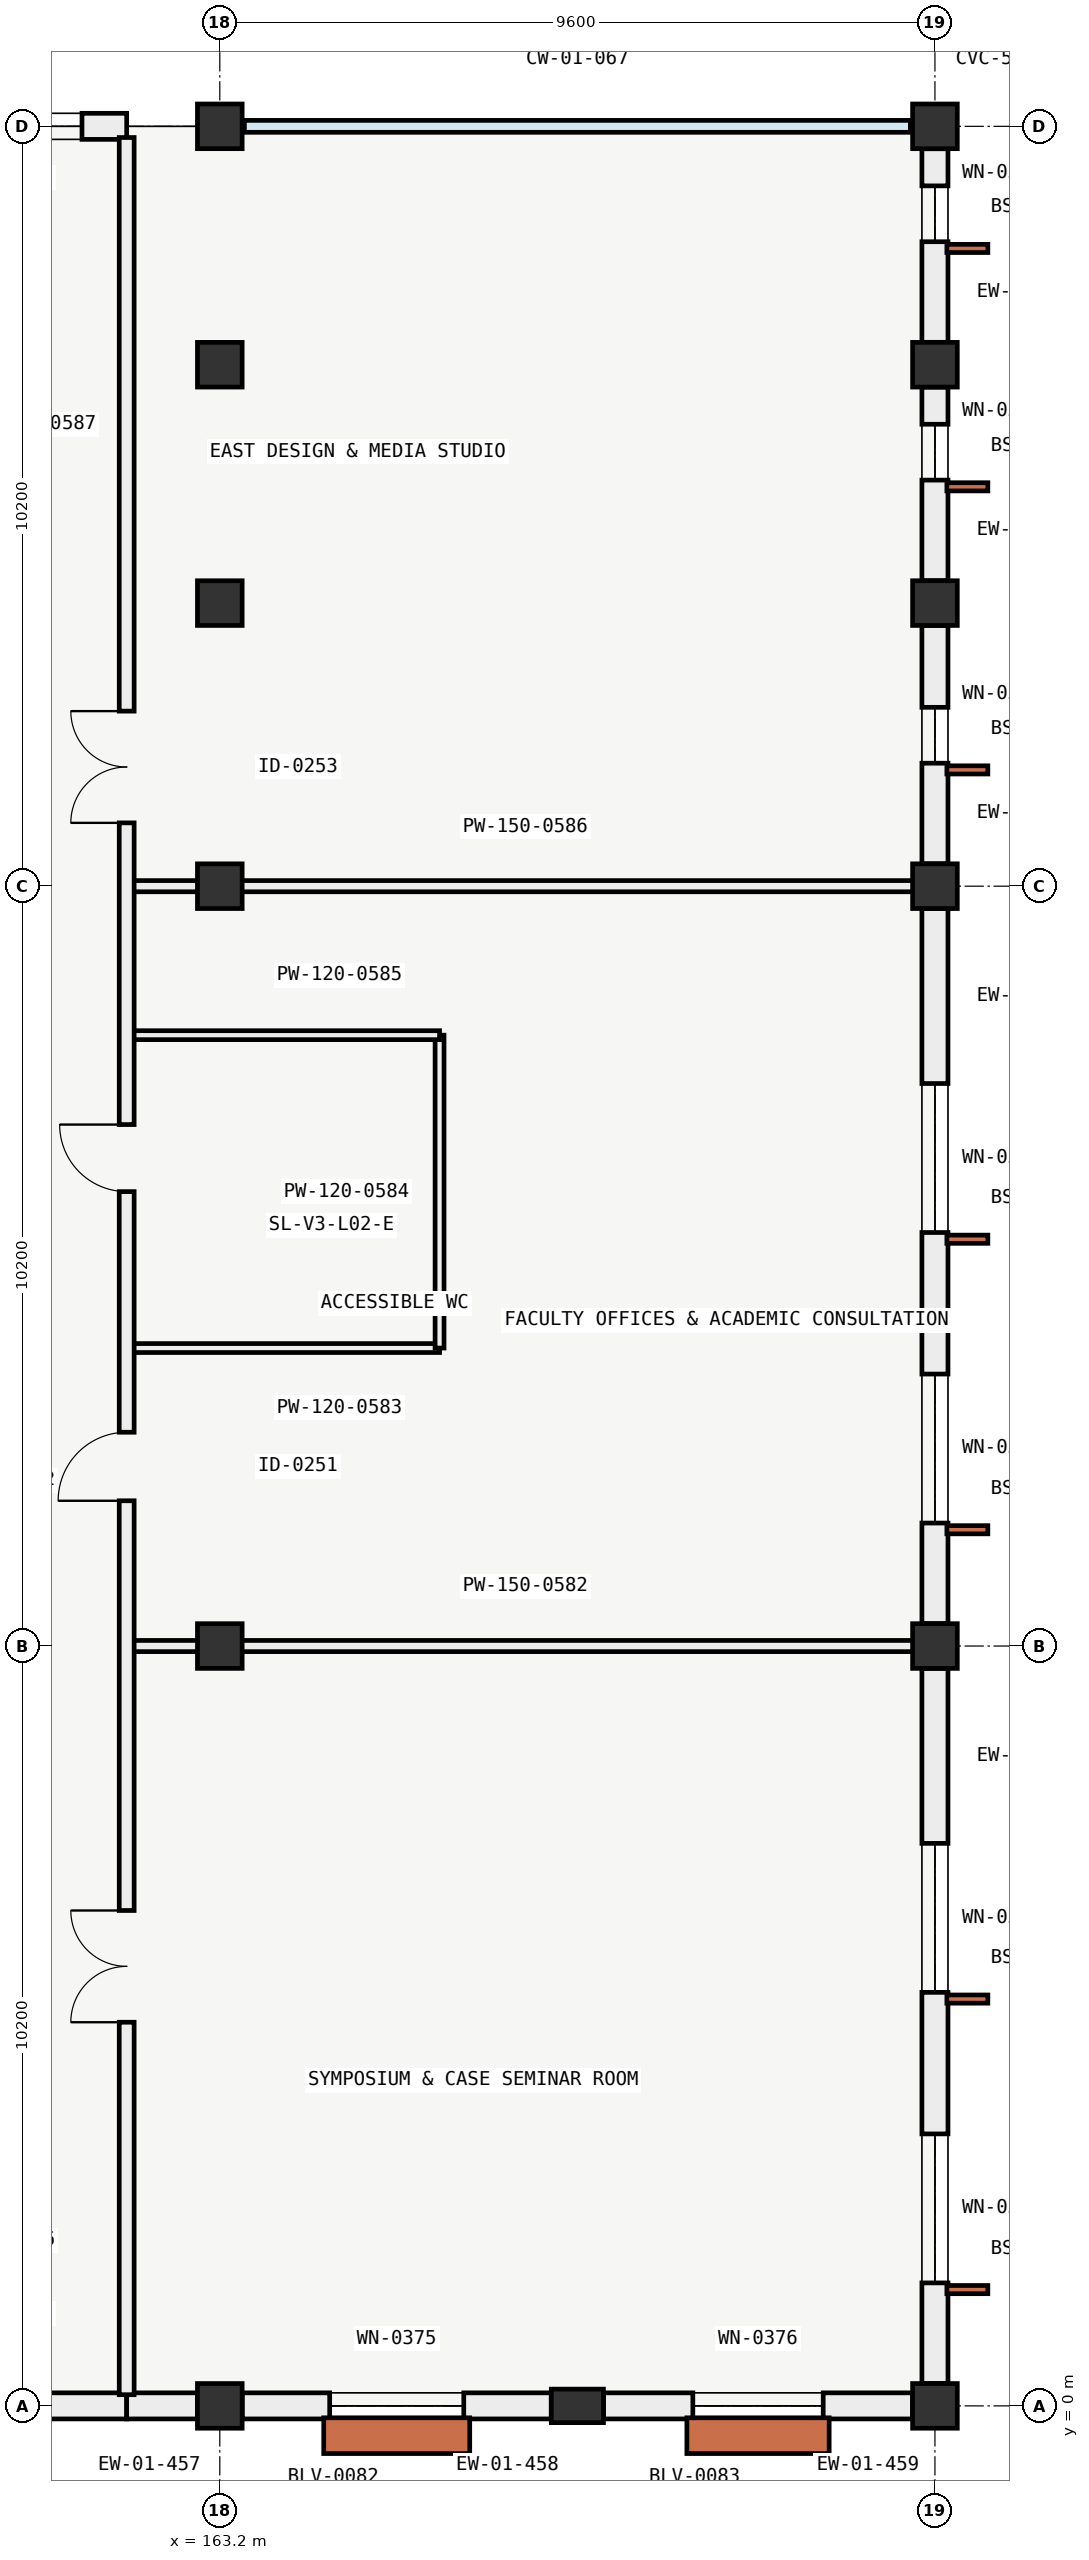
"""IFC4 building model, lengths in metres.
Left out: names, types, materials, properties, quantities, classifications, styles, units other than length and angle.
Written with IfcOpenShell. Run it as: python <this file> out.ifc"""

import sys

from ifc_helpers import new_model, si_unit, direction, frame, frame_2d, origin, origin_2d, place, context, subcontext, project, spatial, rectangle, extrude, element, fill, save


model = new_model("IFC4")
c1 = context("Model", 3, precision=1e-05, world=origin(), true_north=direction((0.0, 1.0)))
c2 = subcontext(c1, "Body", "Model", "MODEL_VIEW")
j1 = project(units=[si_unit("LENGTHUNIT", "METRE"), si_unit("PLANEANGLEUNIT", "RADIAN")], contexts=[c1])
p1 = place(None, origin())
s1 = spatial("IfcSite", under=j1, at=p1, CompositionType="ELEMENT")
p2 = place(p1, origin())
s2 = spatial("IfcBuilding", under=s1, at=p2, CompositionType="ELEMENT")
p3 = place(p2, frame((0.0, 0.0, 9.6)))
s3 = spatial("IfcBuildingStorey", under=s2, at=p3, CompositionType="ELEMENT", Elevation=9.6)
for number, where, z_axis, x_axis in (
    (1, (163.2, 0.0, 0.0), (0.0, 0.0, 1.0), (1.0, 0.0, 0.0)),
    (2, (163.2, 10.2, 0.0), (0.0, 0.0, 1.0), (1.0, 0.0, 0.0)),
    (3, (163.2, 20.4, 0.0), (0.0, 0.0, 1.0), (1.0, 0.0, 0.0)),
    (4, (163.2, 24.2, 0.0), (0.0, 0.0, 1.0), (1.0, 0.0, 0.0)),
    (5, (163.2, 27.4, 0.0), (0.0, 0.0, 1.0), (1.0, 0.0, 0.0)),
    (6, (163.2, 30.6, 0.0), (0.0, 0.0, 1.0), (1.0, 0.0, 0.0)),
    (7, (172.8, 0.0, 0.0), (0.0, 0.0, 1.0), (1.0, 0.0, 0.0)),
    (8, (172.8, 10.2, 0.0), (0.0, 0.0, 1.0), (1.0, 0.0, 0.0)),
    (9, (172.8, 20.4, 0.0), (0.0, 0.0, 1.0), (1.0, 0.0, 0.0)),
    (10, (172.8, 24.2, 0.0), (0.0, 0.0, 1.0), (1.0, 0.0, 0.0)),
    (11, (172.8, 27.4, 0.0), (0.0, 0.0, 1.0), (1.0, 0.0, 0.0)),
    (12, (172.8, 30.6, 0.0), (0.0, 0.0, 1.0), (1.0, 0.0, 0.0)),
):
    element("IfcColumn", number, at=place(p3, frame(where, z_axis=z_axis, x_axis=x_axis)), inside=s3, PredefinedType="COLUMN", context=c2, shape_type="SweptSolid", body=[
        extrude(rectangle(XDim=0.6, YDim=0.6, at=origin_2d()), origin(), (0.0, 0.0, 1.0), 4.2),
    ])
p4 = place(p3, frame((168.0, 0.0, 0.0), z_axis=(0.0, 0.0, 1.0), x_axis=(0.0, 1.0, 0.0)))
e13 = element("IfcColumn", 13, at=p4, inside=s3, PredefinedType="PILASTER", context=c2, shape_type="SweptSolid", body=[
    extrude(rectangle(XDim=0.45, YDim=0.7, at=origin_2d()), origin(), (0.0, 0.0, 1.0), 4.2),
])
p5 = place(p3, frame((161.95, 0.0, 0.0), z_axis=(0.0, 0.0, 1.0), x_axis=(-1.0, 0.0, 0.0)))
e14 = element("IfcWall", 14, at=p5, inside=s3, PredefinedType="SOLIDWALL", context=c2, shape_type="SweptSolid", body=[
    extrude(rectangle(XDim=3.199, YDim=0.35, at=frame_2d((1.6, 0.0))), origin(), (0.0, 0.0, 1.0), 3.25),
])
p6 = place(p5, frame((1.05, 0.0, 0.75)))
e15 = element("IfcOpeningElement", 15, at=p6, cuts=e14, PredefinedType="OPENING", context=c2, shape_type="SweptSolid", body=[
    extrude(rectangle(XDim=1.1, YDim=2.3, at=frame_2d((0.55, 1.15))), frame((0.0, 0.185, 0.0), z_axis=(0.0, -1.0, 0.0), x_axis=(1.0, 0.0, 0.0)), (0.0, 0.0, 1.0), 0.37),
])
p7 = place(p3, frame((162.899, 0.0, 0.0), z_axis=(0.0, 0.0, 1.0), x_axis=(-1.0, 0.0, 0.0)))
e16 = element("IfcWall", 16, at=p7, inside=s3, PredefinedType="SOLIDWALL", context=c2, shape_type="SweptSolid", body=[
    extrude(rectangle(XDim=0.949, YDim=0.35, at=frame_2d((0.475, 0.0))), origin(), (0.0, 0.0, 1.0), 3.25),
])
p8 = place(p3, frame((167.649, 0.0, 0.0), z_axis=(0.0, 0.0, 1.0), x_axis=(-1.0, 0.0, 0.0)))
e17 = element("IfcWall", 17, at=p8, inside=s3, PredefinedType="SOLIDWALL", context=c2, shape_type="SweptSolid", body=[
    extrude(rectangle(XDim=4.148, YDim=0.35, at=frame_2d((2.074, 0.0))), origin(), (0.0, 0.0, 1.0), 3.25),
])
p9 = place(p8, frame((1.174, 0.0, 0.85)))
e18 = element("IfcOpeningElement", 18, at=p9, cuts=e17, PredefinedType="OPENING", context=c2, shape_type="SweptSolid", body=[
    extrude(rectangle(XDim=1.8, YDim=2.1, at=frame_2d((0.9, 1.05))), frame((0.0, 0.185, 0.0), z_axis=(0.0, -1.0, 0.0), x_axis=(1.0, 0.0, 0.0)), (0.0, 0.0, 1.0), 0.37),
])
p10 = place(p3, frame((172.499, 0.0, 0.0), z_axis=(0.0, 0.0, 1.0), x_axis=(-1.0, 0.0, 0.0)))
e19 = element("IfcWall", 19, at=p10, inside=s3, PredefinedType="SOLIDWALL", context=c2, shape_type="SweptSolid", body=[
    extrude(rectangle(XDim=4.148, YDim=0.35, at=frame_2d((2.074, 0.0))), origin(), (0.0, 0.0, 1.0), 3.25),
])
p11 = place(p10, frame((1.199, 0.0, 0.85)))
e20 = element("IfcOpeningElement", 20, at=p11, cuts=e19, PredefinedType="OPENING", context=c2, shape_type="SweptSolid", body=[
    extrude(rectangle(XDim=1.75, YDim=2.05, at=frame_2d((0.875, 1.025))), frame((0.0, 0.185, 0.0), z_axis=(0.0, -1.0, 0.0), x_axis=(1.0, 0.0, 0.0)), (0.0, 0.0, 1.0), 0.37),
])
p12 = place(p3, frame((172.8, 9.899, 0.0), z_axis=(0.0, 0.0, 1.0), x_axis=(0.0, -1.0, 0.0)))
e21 = element("IfcWall", 21, at=p12, inside=s3, PredefinedType="SOLIDWALL", context=c2, shape_type="SweptSolid", body=[
    extrude(rectangle(XDim=9.598, YDim=0.35, at=frame_2d((4.799, 0.0))), origin(), (0.0, 0.0, 1.0), 3.25),
])
p13 = place(p12, frame((6.248, 0.0, 0.85)))
e22 = element("IfcOpeningElement", 22, at=p13, cuts=e21, PredefinedType="OPENING", context=c2, shape_type="SweptSolid", body=[
    extrude(rectangle(XDim=2.0, YDim=1.35, at=frame_2d((1.0, 0.675))), frame((0.0, 0.185, 0.0), z_axis=(0.0, -1.0, 0.0), x_axis=(1.0, 0.0, 0.0)), (0.0, 0.0, 1.0), 0.37),
])
p14 = place(p12, frame((2.348, 0.0, 0.85)))
e23 = element("IfcOpeningElement", 23, at=p14, cuts=e21, PredefinedType="OPENING", context=c2, shape_type="SweptSolid", body=[
    extrude(rectangle(XDim=2.0, YDim=1.35, at=frame_2d((1.0, 0.675))), frame((0.0, 0.185, 0.0), z_axis=(0.0, -1.0, 0.0), x_axis=(1.0, 0.0, 0.0)), (0.0, 0.0, 1.0), 0.37),
])
p15 = place(p3, frame((172.8, 20.099, 0.0), z_axis=(0.0, 0.0, 1.0), x_axis=(0.0, -1.0, 0.0)))
e24 = element("IfcWall", 24, at=p15, inside=s3, PredefinedType="SOLIDWALL", context=c2, shape_type="SweptSolid", body=[
    extrude(rectangle(XDim=9.598, YDim=0.35, at=frame_2d((4.799, 0.0))), origin(), (0.0, 0.0, 1.0), 3.25),
])
p16 = place(p15, frame((6.248, 0.0, 0.85)))
e25 = element("IfcOpeningElement", 25, at=p16, cuts=e24, PredefinedType="OPENING", context=c2, shape_type="SweptSolid", body=[
    extrude(rectangle(XDim=2.0, YDim=1.35, at=frame_2d((1.0, 0.675))), frame((0.0, 0.185, 0.0), z_axis=(0.0, -1.0, 0.0), x_axis=(1.0, 0.0, 0.0)), (0.0, 0.0, 1.0), 0.37),
])
p17 = place(p15, frame((2.348, 0.0, 0.85)))
e26 = element("IfcOpeningElement", 26, at=p17, cuts=e24, PredefinedType="OPENING", context=c2, shape_type="SweptSolid", body=[
    extrude(rectangle(XDim=2.0, YDim=1.35, at=frame_2d((1.0, 0.675))), frame((0.0, 0.185, 0.0), z_axis=(0.0, -1.0, 0.0), x_axis=(1.0, 0.0, 0.0)), (0.0, 0.0, 1.0), 0.37),
])
p18 = place(p3, frame((172.8, 30.299, 0.0), z_axis=(0.0, 0.0, 1.0), x_axis=(0.0, -1.0, 0.0)))
e27 = element("IfcWall", 27, at=p18, inside=s3, PredefinedType="SOLIDWALL", context=c2, shape_type="SweptSolid", body=[
    extrude(rectangle(XDim=2.598, YDim=0.35, at=frame_2d((1.299, 0.0))), origin(), (0.0, 0.0, 1.0), 2.33),
])
p19 = place(p18, frame((0.498, 0.0, 0.85)))
e28 = element("IfcOpeningElement", 28, at=p19, cuts=e27, PredefinedType="OPENING", context=c2, shape_type="SweptSolid", body=[
    extrude(rectangle(XDim=0.75, YDim=1.1, at=frame_2d((0.375, 0.55))), frame((0.0, 0.185, 0.0), z_axis=(0.0, -1.0, 0.0), x_axis=(1.0, 0.0, 0.0)), (0.0, 0.0, 1.0), 0.37),
])
p20 = place(p3, frame((172.8, 27.099, 0.0), z_axis=(0.0, 0.0, 1.0), x_axis=(0.0, -1.0, 0.0)))
e29 = element("IfcWall", 29, at=p20, inside=s3, PredefinedType="SOLIDWALL", context=c2, shape_type="SweptSolid", body=[
    extrude(rectangle(XDim=2.598, YDim=0.35, at=frame_2d((1.299, 0.0))), origin(), (0.0, 0.0, 1.0), 2.33),
])
p21 = place(p20, frame((0.498, 0.0, 0.85)))
e30 = element("IfcOpeningElement", 30, at=p21, cuts=e29, PredefinedType="OPENING", context=c2, shape_type="SweptSolid", body=[
    extrude(rectangle(XDim=0.75, YDim=1.1, at=frame_2d((0.375, 0.55))), frame((0.0, 0.185, 0.0), z_axis=(0.0, -1.0, 0.0), x_axis=(1.0, 0.0, 0.0)), (0.0, 0.0, 1.0), 0.37),
])
p22 = place(p3, frame((172.8, 23.899, 0.0), z_axis=(0.0, 0.0, 1.0), x_axis=(0.0, -1.0, 0.0)))
e31 = element("IfcWall", 31, at=p22, inside=s3, PredefinedType="SOLIDWALL", context=c2, shape_type="SweptSolid", body=[
    extrude(rectangle(XDim=3.198, YDim=0.35, at=frame_2d((1.599, 0.0))), origin(), (0.0, 0.0, 1.0), 2.33),
])
p23 = place(p22, frame((1.098, 0.0, 0.85)))
e32 = element("IfcOpeningElement", 32, at=p23, cuts=e31, PredefinedType="OPENING", context=c2, shape_type="SweptSolid", body=[
    extrude(rectangle(XDim=0.75, YDim=1.1, at=frame_2d((0.375, 0.55))), frame((0.0, 0.185, 0.0), z_axis=(0.0, -1.0, 0.0), x_axis=(1.0, 0.0, 0.0)), (0.0, 0.0, 1.0), 0.37),
])
p24 = place(p3, frame((158.75, 30.6, 0.0), z_axis=(0.0, 0.0, 1.0), x_axis=(1.0, 0.0, 0.0)))
e33 = element("IfcWall", 33, at=p24, inside=s3, PredefinedType="SOLIDWALL", context=c2, shape_type="SweptSolid", body=[
    extrude(rectangle(XDim=3.2, YDim=0.35, at=frame_2d((1.6, 0.0))), origin(), (0.0, 0.0, 1.0), 3.25),
])
p25 = place(p24, frame((0.6, 0.0, 0.75)))
e34 = element("IfcOpeningElement", 34, at=p25, cuts=e33, PredefinedType="OPENING", context=c2, shape_type="SweptSolid", body=[
    extrude(rectangle(XDim=2.0, YDim=1.35, at=frame_2d((1.0, 0.675))), frame((0.0, 0.185, 0.0), z_axis=(0.0, -1.0, 0.0), x_axis=(1.0, 0.0, 0.0)), (0.0, 0.0, 1.0), 0.37),
])
p26 = place(p3, frame((161.95, 10.2, 0.0), z_axis=(0.0, 0.0, 1.0), x_axis=(1.0, 0.0, 0.0)))
e35 = element("IfcWall", 35, at=p26, inside=s3, PredefinedType="PARTITIONING", context=c2, shape_type="SweptSolid", body=[
    extrude(rectangle(XDim=10.7, YDim=0.15, at=frame_2d((5.35, 0.0))), origin(), (0.0, 0.0, 1.0), 3.23),
])
p27 = place(p3, frame((161.95, 14.2, 0.0), z_axis=(0.0, 0.0, 1.0), x_axis=(1.0, 0.0, 0.0)))
e36 = element("IfcWall", 36, at=p27, inside=s3, PredefinedType="PARTITIONING", context=c2, shape_type="SweptSolid", body=[
    extrude(rectangle(XDim=4.2, YDim=0.12, at=frame_2d((2.1, 0.0))), origin(), (0.0, 0.0, 1.0), 3.28),
])
p28 = place(p3, frame((166.15, 14.2, 0.0), z_axis=(0.0, 0.0, 1.0), x_axis=(0.0, 1.0, 0.0)))
e37 = element("IfcWall", 37, at=p28, inside=s3, PredefinedType="PARTITIONING", context=c2, shape_type="SweptSolid", body=[
    extrude(rectangle(XDim=4.2, YDim=0.12, at=frame_2d((2.1, 0.0))), origin(), (0.0, 0.0, 1.0), 3.85),
])
p29 = place(p3, frame((161.95, 18.4, 0.0), z_axis=(0.0, 0.0, 1.0), x_axis=(1.0, 0.0, 0.0)))
e38 = element("IfcWall", 38, at=p29, inside=s3, PredefinedType="PARTITIONING", context=c2, shape_type="SweptSolid", body=[
    extrude(rectangle(XDim=4.2, YDim=0.12, at=frame_2d((2.1, 0.0))), origin(), (0.0, 0.0, 1.0), 3.28),
])
p30 = place(p3, frame((161.95, 20.4, 0.0), z_axis=(0.0, 0.0, 1.0), x_axis=(1.0, 0.0, 0.0)))
e39 = element("IfcWall", 39, at=p30, inside=s3, PredefinedType="PARTITIONING", context=c2, shape_type="SweptSolid", body=[
    extrude(rectangle(XDim=10.7, YDim=0.15, at=frame_2d((5.35, 0.0))), origin(), (0.0, 0.0, 1.0), 2.33),
])
p31 = place(p3, frame((161.95, 0.15, 0.0), z_axis=(0.0, 0.0, 1.0), x_axis=(0.0, 1.0, 0.0)))
e40 = element("IfcWall", 40, at=p31, inside=s3, PredefinedType="PARTITIONING", context=c2, shape_type="SweptSolid", body=[
    extrude(rectangle(XDim=30.3, YDim=0.2, at=frame_2d((15.15, 0.0))), origin(), (0.0, 0.0, 1.0), 3.23),
])
p32 = place(p31, frame((5.0, 0.0, 0.0)))
e41 = element("IfcOpeningElement", 41, at=p32, cuts=e40, PredefinedType="OPENING", context=c2, shape_type="SweptSolid", body=[
    extrude(rectangle(XDim=1.5, YDim=2.2, at=frame_2d((0.75, 1.1))), frame((0.0, 0.11, 0.0), z_axis=(0.0, -1.0, 0.0), x_axis=(1.0, 0.0, 0.0)), (0.0, 0.0, 1.0), 0.22),
])
p33 = place(p31, frame((12.0, 0.0, 0.0)))
e42 = element("IfcOpeningElement", 42, at=p33, cuts=e40, PredefinedType="OPENING", context=c2, shape_type="SweptSolid", body=[
    extrude(rectangle(XDim=0.92, YDim=2.1, at=frame_2d((0.46, 1.05))), frame((0.0, 0.11, 0.0), z_axis=(0.0, -1.0, 0.0), x_axis=(1.0, 0.0, 0.0)), (0.0, 0.0, 1.0), 0.22),
])
p34 = place(p31, frame((16.15, 0.0, 0.0)))
e43 = element("IfcOpeningElement", 43, at=p34, cuts=e40, PredefinedType="OPENING", context=c2, shape_type="SweptSolid", body=[
    extrude(rectangle(XDim=0.9, YDim=2.05, at=frame_2d((0.45, 1.025))), frame((0.0, 0.11, 0.0), z_axis=(0.0, -1.0, 0.0), x_axis=(1.0, 0.0, 0.0)), (0.0, 0.0, 1.0), 0.22),
])
p35 = place(p31, frame((21.1, 0.0, 0.0)))
e44 = element("IfcOpeningElement", 44, at=p35, cuts=e40, PredefinedType="OPENING", context=c2, shape_type="SweptSolid", body=[
    extrude(rectangle(XDim=1.5, YDim=2.2, at=frame_2d((0.75, 1.1))), frame((0.0, 0.11, 0.0), z_axis=(0.0, -1.0, 0.0), x_axis=(1.0, 0.0, 0.0)), (0.0, 0.0, 1.0), 0.22),
])
p36 = place(p9, origin())
e45 = element("IfcWindow", 45, at=p36, inside=s3, PartitioningType="SINGLE_PANEL", PredefinedType="WINDOW", context=c2, shape_type="SweptSolid", body=[
    extrude(rectangle(XDim=1.8, YDim=2.1, at=frame_2d((0.9, 1.05))), frame((0.0, 0.03, 0.0), z_axis=(0.0, -1.0, 0.0), x_axis=(1.0, 0.0, 0.0)), (0.0, 0.0, 1.0), 0.06),
])
fill(e18, e45)
p37 = place(p11, origin())
e46 = element("IfcWindow", 46, at=p37, inside=s3, PartitioningType="SINGLE_PANEL", PredefinedType="WINDOW", context=c2, shape_type="SweptSolid", body=[
    extrude(rectangle(XDim=1.75, YDim=2.05, at=frame_2d((0.875, 1.025))), frame((0.0, 0.03, 0.0), z_axis=(0.0, -1.0, 0.0), x_axis=(1.0, 0.0, 0.0)), (0.0, 0.0, 1.0), 0.06),
])
fill(e20, e46)
p38 = place(p13, origin())
e47 = element("IfcWindow", 47, at=p38, inside=s3, PartitioningType="SINGLE_PANEL", PredefinedType="WINDOW", context=c2, shape_type="SweptSolid", body=[
    extrude(rectangle(XDim=2.0, YDim=1.35, at=frame_2d((1.0, 0.675))), frame((0.0, 0.03, 0.0), z_axis=(0.0, -1.0, 0.0), x_axis=(1.0, 0.0, 0.0)), (0.0, 0.0, 1.0), 0.06),
])
fill(e22, e47)
p39 = place(p14, origin())
e48 = element("IfcWindow", 48, at=p39, inside=s3, PartitioningType="SINGLE_PANEL", PredefinedType="WINDOW", context=c2, shape_type="SweptSolid", body=[
    extrude(rectangle(XDim=2.0, YDim=1.35, at=frame_2d((1.0, 0.675))), frame((0.0, 0.03, 0.0), z_axis=(0.0, -1.0, 0.0), x_axis=(1.0, 0.0, 0.0)), (0.0, 0.0, 1.0), 0.06),
])
fill(e23, e48)
p40 = place(p16, origin())
e49 = element("IfcWindow", 49, at=p40, inside=s3, PartitioningType="SINGLE_PANEL", PredefinedType="WINDOW", context=c2, shape_type="SweptSolid", body=[
    extrude(rectangle(XDim=2.0, YDim=1.35, at=frame_2d((1.0, 0.675))), frame((0.0, 0.03, 0.0), z_axis=(0.0, -1.0, 0.0), x_axis=(1.0, 0.0, 0.0)), (0.0, 0.0, 1.0), 0.06),
])
fill(e25, e49)
p41 = place(p17, origin())
e50 = element("IfcWindow", 50, at=p41, inside=s3, PartitioningType="SINGLE_PANEL", PredefinedType="WINDOW", context=c2, shape_type="SweptSolid", body=[
    extrude(rectangle(XDim=2.0, YDim=1.35, at=frame_2d((1.0, 0.675))), frame((0.0, 0.03, 0.0), z_axis=(0.0, -1.0, 0.0), x_axis=(1.0, 0.0, 0.0)), (0.0, 0.0, 1.0), 0.06),
])
fill(e26, e50)
p42 = place(p19, origin())
e51 = element("IfcWindow", 51, at=p42, inside=s3, PartitioningType="SINGLE_PANEL", PredefinedType="WINDOW", context=c2, shape_type="SweptSolid", body=[
    extrude(rectangle(XDim=0.75, YDim=1.1, at=frame_2d((0.375, 0.55))), frame((0.0, 0.03, 0.0), z_axis=(0.0, -1.0, 0.0), x_axis=(1.0, 0.0, 0.0)), (0.0, 0.0, 1.0), 0.06),
])
fill(e28, e51)
p43 = place(p21, origin())
e52 = element("IfcWindow", 52, at=p43, inside=s3, PartitioningType="SINGLE_PANEL", PredefinedType="WINDOW", context=c2, shape_type="SweptSolid", body=[
    extrude(rectangle(XDim=0.75, YDim=1.1, at=frame_2d((0.375, 0.55))), frame((0.0, 0.03, 0.0), z_axis=(0.0, -1.0, 0.0), x_axis=(1.0, 0.0, 0.0)), (0.0, 0.0, 1.0), 0.06),
])
fill(e30, e52)
p44 = place(p23, origin())
e53 = element("IfcWindow", 53, at=p44, inside=s3, PartitioningType="SINGLE_PANEL", PredefinedType="WINDOW", context=c2, shape_type="SweptSolid", body=[
    extrude(rectangle(XDim=0.75, YDim=1.1, at=frame_2d((0.375, 0.55))), frame((0.0, 0.03, 0.0), z_axis=(0.0, -1.0, 0.0), x_axis=(1.0, 0.0, 0.0)), (0.0, 0.0, 1.0), 0.06),
])
fill(e32, e53)
p45 = place(p25, origin())
e54 = element("IfcWindow", 54, at=p45, inside=s3, PartitioningType="SINGLE_PANEL", PredefinedType="WINDOW", context=c2, shape_type="SweptSolid", body=[
    extrude(rectangle(XDim=2.0, YDim=1.35, at=frame_2d((1.0, 0.675))), frame((0.0, 0.03, 0.0), z_axis=(0.0, -1.0, 0.0), x_axis=(1.0, 0.0, 0.0)), (0.0, 0.0, 1.0), 0.06),
])
fill(e34, e54)
p46 = place(p32, origin())
e55 = element("IfcDoor", 55, at=p46, inside=s3, OperationType="DOUBLE_DOOR_SINGLE_SWING", PredefinedType="DOOR", context=c2, shape_type="SweptSolid", body=[
    extrude(rectangle(XDim=1.5, YDim=2.2, at=frame_2d((0.75, 1.1))), frame((0.0, 0.025, 0.0), z_axis=(0.0, -1.0, 0.0), x_axis=(1.0, 0.0, 0.0)), (0.0, 0.0, 1.0), 0.05),
])
fill(e41, e55)
p47 = place(p33, origin())
e56 = element("IfcDoor", 56, at=p47, inside=s3, OperationType="SINGLE_SWING_LEFT", PredefinedType="DOOR", context=c2, shape_type="SweptSolid", body=[
    extrude(rectangle(XDim=0.92, YDim=2.1, at=frame_2d((0.46, 1.05))), frame((0.0, 0.025, 0.0), z_axis=(0.0, -1.0, 0.0), x_axis=(1.0, 0.0, 0.0)), (0.0, 0.0, 1.0), 0.05),
])
fill(e42, e56)
p48 = place(p34, origin())
e57 = element("IfcDoor", 57, at=p48, inside=s3, OperationType="SINGLE_SWING_RIGHT", PredefinedType="DOOR", context=c2, shape_type="SweptSolid", body=[
    extrude(rectangle(XDim=0.9, YDim=2.05, at=frame_2d((0.45, 1.025))), frame((0.0, 0.025, 0.0), z_axis=(0.0, -1.0, 0.0), x_axis=(1.0, 0.0, 0.0)), (0.0, 0.0, 1.0), 0.05),
])
fill(e43, e57)
p49 = place(p35, origin())
e58 = element("IfcDoor", 58, at=p49, inside=s3, OperationType="DOUBLE_DOOR_SINGLE_SWING", PredefinedType="DOOR", context=c2, shape_type="SweptSolid", body=[
    extrude(rectangle(XDim=1.5, YDim=2.2, at=frame_2d((0.75, 1.1))), frame((0.0, 0.025, 0.0), z_axis=(0.0, -1.0, 0.0), x_axis=(1.0, 0.0, 0.0)), (0.0, 0.0, 1.0), 0.05),
])
fill(e44, e58)
save(model, sys.argv[1])
